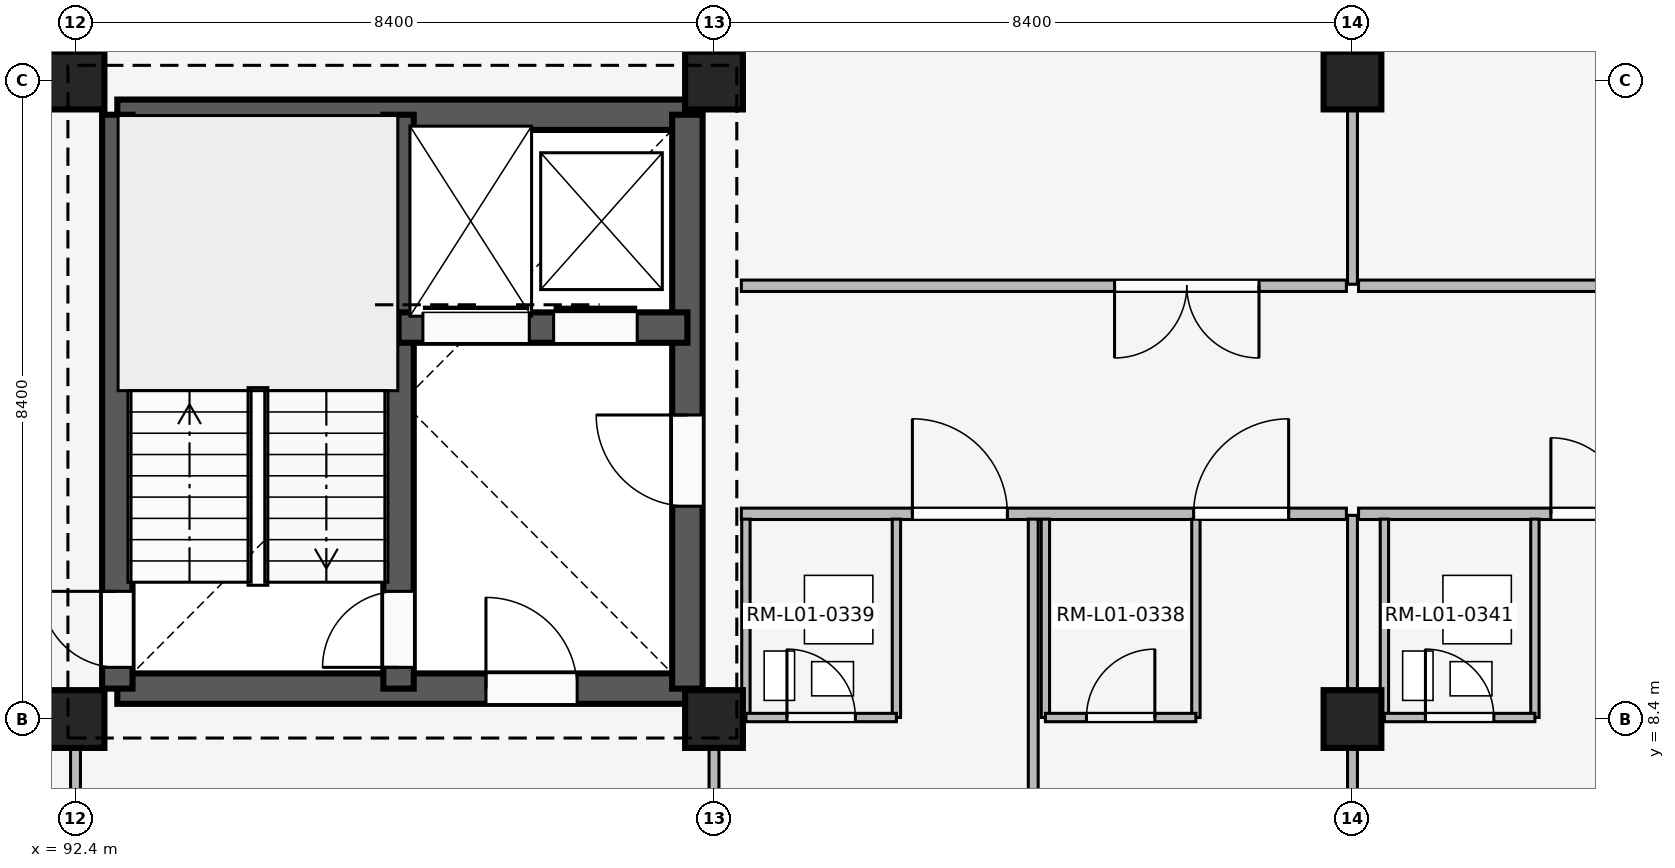
"""IFC4 building model, lengths in metres.
Left out: names, types, materials, properties, quantities, classifications, styles, units other than length and angle.
Written with IfcOpenShell. Run it as: python <this file> out.ifc"""

import sys

from ifc_helpers import new_model, si_unit, direction, frame, frame_2d, origin, origin_2d, place, context, subcontext, project, spatial, rectangle, extrude, element, fill, save


model = new_model("IFC4")
c1 = context("Model", 3, precision=1e-05, world=origin(), true_north=direction((0.0, 1.0)))
c2 = subcontext(c1, "Body", "Model", "MODEL_VIEW")
j1 = project(units=[si_unit("LENGTHUNIT", "METRE"), si_unit("PLANEANGLEUNIT", "RADIAN")], contexts=[c1])
p1 = place(None, origin())
s1 = spatial("IfcSite", under=j1, at=p1, CompositionType="ELEMENT")
p2 = place(p1, origin())
s2 = spatial("IfcBuilding", under=s1, at=p2, CompositionType="ELEMENT")
p3 = place(p2, frame((0.0, 0.0, 4.8)))
s3 = spatial("IfcBuildingStorey", under=s2, at=p3, CompositionType="ELEMENT", Elevation=4.8)
for number, where, z_axis, x_axis in (
    (1, (92.4, 8.4, 0.0), (0.0, 0.0, 1.0), (1.0, 0.0, 0.0)),
    (2, (92.4, 16.8, 0.0), (0.0, 0.0, 1.0), (1.0, 0.0, 0.0)),
    (3, (100.8, 8.4, 0.0), (0.0, 0.0, 1.0), (1.0, 0.0, 0.0)),
    (4, (100.8, 16.8, 0.0), (0.0, 0.0, 1.0), (1.0, 0.0, 0.0)),
    (5, (109.2, 8.4, 0.0), (0.0, 0.0, 1.0), (1.0, 0.0, 0.0)),
    (6, (109.2, 16.8, 0.0), (0.0, 0.0, 1.0), (1.0, 0.0, 0.0)),
):
    element("IfcColumn", number, at=place(p3, frame(where, z_axis=z_axis, x_axis=x_axis)), inside=s3, PredefinedType="COLUMN", context=c2, shape_type="SweptSolid", body=[
        extrude(rectangle(XDim=0.76, YDim=0.76, at=origin_2d()), origin(), (0.0, 0.0, 1.0), 3.3),
    ])
p4 = place(p3, frame((92.95, 8.8, 0.0), z_axis=(0.0, 0.0, 1.0), x_axis=(1.0, 0.0, 0.0)))
e7 = element("IfcWall", 7, at=p4, inside=s3, PredefinedType="SHEAR", context=c2, shape_type="SweptSolid", body=[
    extrude(rectangle(XDim=7.5, YDim=0.4, at=frame_2d((3.75, 0.0))), origin(), (0.0, 0.0, 1.0), 3.02),
])
p5 = place(p4, frame((4.85, 0.0, 0.0)))
e8 = element("IfcOpeningElement", 8, at=p5, cuts=e7, PredefinedType="OPENING", context=c2, shape_type="SweptSolid", body=[
    extrude(rectangle(XDim=1.2, YDim=2.1, at=frame_2d((0.6, 1.05))), frame((0.0, 0.21, 0.0), z_axis=(0.0, -1.0, 0.0), x_axis=(1.0, 0.0, 0.0)), (0.0, 0.0, 1.0), 0.42),
])
p6 = place(p3, frame((92.95, 16.35, 0.0), z_axis=(0.0, 0.0, 1.0), x_axis=(1.0, 0.0, 0.0)))
e9 = element("IfcWall", 9, at=p6, inside=s3, PredefinedType="SHEAR", context=c2, shape_type="SweptSolid", body=[
    extrude(rectangle(XDim=7.5, YDim=0.4, at=frame_2d((3.75, 0.0))), origin(), (0.0, 0.0, 1.0), 3.02),
])
p7 = place(p3, frame((92.95, 8.8, 0.0), z_axis=(0.0, 0.0, 1.0), x_axis=(0.0, 1.0, 0.0)))
e10 = element("IfcWall", 10, at=p7, inside=s3, PredefinedType="SHEAR", context=c2, shape_type="SweptSolid", body=[
    extrude(rectangle(XDim=7.55, YDim=0.4, at=frame_2d((3.775, 0.0))), origin(), (0.0, 0.0, 1.0), 3.02),
])
p8 = place(p7, frame((0.28, 0.0, 0.0)))
e11 = element("IfcOpeningElement", 11, at=p8, cuts=e10, PredefinedType="OPENING", context=c2, shape_type="SweptSolid", body=[
    extrude(rectangle(XDim=1.0, YDim=2.15, at=frame_2d((0.5, 1.075))), frame((0.0, 0.21, 0.0), z_axis=(0.0, -1.0, 0.0), x_axis=(1.0, 0.0, 0.0)), (0.0, 0.0, 1.0), 0.42),
])
p9 = place(p3, frame((100.45, 8.8, 0.0), z_axis=(0.0, 0.0, 1.0), x_axis=(0.0, 1.0, 0.0)))
e12 = element("IfcWall", 12, at=p9, inside=s3, PredefinedType="SHEAR", context=c2, shape_type="SweptSolid", body=[
    extrude(rectangle(XDim=7.55, YDim=0.4, at=frame_2d((3.775, 0.0))), origin(), (0.0, 0.0, 1.0), 3.02),
])
p10 = place(p9, frame((2.4, 0.0, 0.0)))
e13 = element("IfcOpeningElement", 13, at=p10, cuts=e12, PredefinedType="OPENING", context=c2, shape_type="SweptSolid", body=[
    extrude(rectangle(XDim=1.2, YDim=2.2, at=frame_2d((0.6, 1.1))), frame((0.0, 0.21, 0.0), z_axis=(0.0, -1.0, 0.0), x_axis=(1.0, 0.0, 0.0)), (0.0, 0.0, 1.0), 0.42),
])
p11 = place(p3, frame((96.65, 8.8, 0.0), z_axis=(0.0, 0.0, 1.0), x_axis=(0.0, 1.0, 0.0)))
e14 = element("IfcWall", 14, at=p11, inside=s3, PredefinedType="SHEAR", context=c2, shape_type="SweptSolid", body=[
    extrude(rectangle(XDim=7.55, YDim=0.4, at=frame_2d((3.775, 0.0))), origin(), (0.0, 0.0, 1.0), 3.02),
])
p12 = place(p11, frame((0.28, 0.0, 0.0)))
e15 = element("IfcOpeningElement", 15, at=p12, cuts=e14, PredefinedType="OPENING", context=c2, shape_type="SweptSolid", body=[
    extrude(rectangle(XDim=1.0, YDim=2.15, at=frame_2d((0.5, 1.075))), frame((0.0, 0.21, 0.0), z_axis=(0.0, -1.0, 0.0), x_axis=(1.0, 0.0, 0.0)), (0.0, 0.0, 1.0), 0.42),
])
p13 = place(p3, frame((96.65, 13.55, 0.0), z_axis=(0.0, 0.0, 1.0), x_axis=(1.0, 0.0, 0.0)))
e16 = element("IfcWall", 16, at=p13, inside=s3, PredefinedType="SHEAR", context=c2, shape_type="SweptSolid", body=[
    extrude(rectangle(XDim=3.8, YDim=0.4, at=frame_2d((1.9, 0.0))), origin(), (0.0, 0.0, 1.0), 3.02),
])
p14 = place(p13, frame((0.32, 0.0, 0.0)))
e17 = element("IfcOpeningElement", 17, at=p14, cuts=e16, PredefinedType="OPENING", context=c2, shape_type="SweptSolid", body=[
    extrude(rectangle(XDim=1.4, YDim=2.25, at=frame_2d((0.7, 1.125))), frame((0.0, 0.21, 0.0), z_axis=(0.0, -1.0, 0.0), x_axis=(1.0, 0.0, 0.0)), (0.0, 0.0, 1.0), 0.42),
])
p15 = place(p13, frame((2.04, 0.0, 0.0)))
e18 = element("IfcOpeningElement", 18, at=p15, cuts=e16, PredefinedType="OPENING", context=c2, shape_type="SweptSolid", body=[
    extrude(rectangle(XDim=1.1, YDim=2.15, at=frame_2d((0.55, 1.075))), frame((0.0, 0.21, 0.0), z_axis=(0.0, -1.0, 0.0), x_axis=(1.0, 0.0, 0.0)), (0.0, 0.0, 1.0), 0.42),
])
p16 = place(p3, frame((92.4, 0.14, 0.0), z_axis=(0.0, 0.0, 1.0), x_axis=(0.0, 1.0, 0.0)))
e19 = element("IfcWall", 19, at=p16, inside=s3, PredefinedType="PARTITIONING", context=c2, shape_type="SweptSolid", body=[
    extrude(rectangle(XDim=8.21, YDim=0.13, at=frame_2d((4.105, 0.0))), origin(), (0.0, 0.0, 1.0), 2.4),
])
p17 = place(p16, frame((3.64, 0.0, 0.0)))
e20 = element("IfcOpeningElement", 20, at=p17, cuts=e19, PredefinedType="OPENING", context=c2, shape_type="SweptSolid", body=[
    extrude(rectangle(XDim=1.08, YDim=2.15, at=frame_2d((0.54, 1.075))), frame((0.0, 0.075, 0.0), z_axis=(0.0, -1.0, 0.0), x_axis=(1.0, 0.0, 0.0)), (0.0, 0.0, 1.0), 0.15),
])
p18 = place(p3, frame((92.4, 17.15, 0.0), z_axis=(0.0, 0.0, 1.0), x_axis=(0.0, 1.0, 0.0)))
e21 = element("IfcWall", 21, at=p18, inside=s3, PredefinedType="PARTITIONING", context=c2, shape_type="SweptSolid", body=[
    extrude(rectangle(XDim=7.91, YDim=0.13, at=frame_2d((3.955, 0.0))), origin(), (0.0, 0.0, 1.0), 2.4),
])
p19 = place(p18, frame((3.4, 0.0, 0.0)))
e22 = element("IfcOpeningElement", 22, at=p19, cuts=e21, PredefinedType="OPENING", context=c2, shape_type="SweptSolid", body=[
    extrude(rectangle(XDim=1.05, YDim=2.2, at=frame_2d((0.525, 1.1))), frame((0.0, 0.075, 0.0), z_axis=(0.0, -1.0, 0.0), x_axis=(1.0, 0.0, 0.0)), (0.0, 0.0, 1.0), 0.15),
])
p20 = place(p3, frame((100.8, 0.14, 0.0), z_axis=(0.0, 0.0, 1.0), x_axis=(0.0, 1.0, 0.0)))
e23 = element("IfcWall", 23, at=p20, inside=s3, PredefinedType="PARTITIONING", context=c2, shape_type="SweptSolid", body=[
    extrude(rectangle(XDim=8.21, YDim=0.13, at=frame_2d((4.105, 0.0))), origin(), (0.0, 0.0, 1.0), 2.4),
])
p21 = place(p20, frame((3.64, 0.0, 0.0)))
e24 = element("IfcOpeningElement", 24, at=p21, cuts=e23, PredefinedType="OPENING", context=c2, shape_type="SweptSolid", body=[
    extrude(rectangle(XDim=1.08, YDim=2.15, at=frame_2d((0.54, 1.075))), frame((0.0, 0.075, 0.0), z_axis=(0.0, -1.0, 0.0), x_axis=(1.0, 0.0, 0.0)), (0.0, 0.0, 1.0), 0.15),
])
p22 = place(p3, frame((100.8, 17.15, 0.0), z_axis=(0.0, 0.0, 1.0), x_axis=(0.0, 1.0, 0.0)))
e25 = element("IfcWall", 25, at=p22, inside=s3, PredefinedType="PARTITIONING", context=c2, shape_type="SweptSolid", body=[
    extrude(rectangle(XDim=7.91, YDim=0.13, at=frame_2d((3.955, 0.0))), origin(), (0.0, 0.0, 1.0), 2.4),
])
p23 = place(p22, frame((3.4, 0.0, 0.0)))
e26 = element("IfcOpeningElement", 26, at=p23, cuts=e25, PredefinedType="OPENING", context=c2, shape_type="SweptSolid", body=[
    extrude(rectangle(XDim=1.05, YDim=2.2, at=frame_2d((0.525, 1.1))), frame((0.0, 0.075, 0.0), z_axis=(0.0, -1.0, 0.0), x_axis=(1.0, 0.0, 0.0)), (0.0, 0.0, 1.0), 0.15),
])
p24 = place(p3, frame((101.16, 11.1, 0.0), z_axis=(0.0, 0.0, 1.0), x_axis=(1.0, 0.0, 0.0)))
e27 = element("IfcWall", 27, at=p24, inside=s3, PredefinedType="PARTITIONING", context=c2, shape_type="SweptSolid", body=[
    extrude(rectangle(XDim=7.96, YDim=0.15, at=frame_2d((3.98, 0.0))), origin(), (0.0, 0.0, 1.0), 2.4),
])
p25 = place(p24, frame((2.25, 0.0, 0.0)))
e28 = element("IfcOpeningElement", 28, at=p25, cuts=e27, PredefinedType="OPENING", context=c2, shape_type="SweptSolid", body=[
    extrude(rectangle(XDim=1.25, YDim=2.2, at=frame_2d((0.625, 1.1))), frame((0.0, 0.085, 0.0), z_axis=(0.0, -1.0, 0.0), x_axis=(1.0, 0.0, 0.0)), (0.0, 0.0, 1.0), 0.17),
])
p26 = place(p24, frame((5.95, 0.0, 0.0)))
e29 = element("IfcOpeningElement", 29, at=p26, cuts=e27, PredefinedType="OPENING", context=c2, shape_type="SweptSolid", body=[
    extrude(rectangle(XDim=1.25, YDim=2.2, at=frame_2d((0.625, 1.1))), frame((0.0, 0.085, 0.0), z_axis=(0.0, -1.0, 0.0), x_axis=(1.0, 0.0, 0.0)), (0.0, 0.0, 1.0), 0.17),
])
p27 = place(p3, frame((105.0, 0.1, 0.0), z_axis=(0.0, 0.0, 1.0), x_axis=(0.0, 1.0, 0.0)))
e30 = element("IfcWall", 30, at=p27, inside=s3, PredefinedType="PARTITIONING", context=c2, shape_type="SweptSolid", body=[
    extrude(rectangle(XDim=10.93, YDim=0.13, at=frame_2d((5.465, 0.0))), origin(), (0.0, 0.0, 1.0), 2.4),
])
for number, where, z_axis, x_axis in (
    (31, (101.22, 8.42, 0.0), (0.0, 0.0, 1.0), (0.0, 1.0, 0.0)),
    (32, (103.2, 8.42, 0.0), (0.0, 0.0, 1.0), (0.0, 1.0, 0.0)),
):
    element("IfcWall", number, at=place(p3, frame(where, z_axis=z_axis, x_axis=x_axis)), inside=s3, PredefinedType="PARTITIONING", context=c2, shape_type="SweptSolid", body=[
        extrude(rectangle(XDim=2.61, YDim=0.11, at=frame_2d((1.305, 0.0))), origin(), (0.0, 0.0, 1.0), 2.4),
    ])
p28 = place(p3, frame((101.22, 8.42, 0.0), z_axis=(0.0, 0.0, 1.0), x_axis=(1.0, 0.0, 0.0)))
e33 = element("IfcWall", 33, at=p28, inside=s3, PredefinedType="PARTITIONING", context=c2, shape_type="SweptSolid", body=[
    extrude(rectangle(XDim=1.98, YDim=0.11, at=frame_2d((0.99, 0.0))), origin(), (0.0, 0.0, 1.0), 2.4),
])
p29 = place(p28, frame((0.54, 0.0, 0.0)))
e34 = element("IfcOpeningElement", 34, at=p29, cuts=e33, PredefinedType="OPENING", context=c2, shape_type="SweptSolid", body=[
    extrude(rectangle(XDim=0.9, YDim=2.1, at=frame_2d((0.45, 1.05))), frame((0.0, 0.065, 0.0), z_axis=(0.0, -1.0, 0.0), x_axis=(1.0, 0.0, 0.0)), (0.0, 0.0, 1.0), 0.13),
])
for number, where, z_axis, x_axis in (
    (35, (105.16, 8.42, 0.0), (0.0, 0.0, 1.0), (0.0, 1.0, 0.0)),
    (36, (107.14, 8.42, 0.0), (0.0, 0.0, 1.0), (0.0, 1.0, 0.0)),
):
    element("IfcWall", number, at=place(p3, frame(where, z_axis=z_axis, x_axis=x_axis)), inside=s3, PredefinedType="PARTITIONING", context=c2, shape_type="SweptSolid", body=[
        extrude(rectangle(XDim=2.61, YDim=0.11, at=frame_2d((1.305, 0.0))), origin(), (0.0, 0.0, 1.0), 2.4),
    ])
p30 = place(p3, frame((105.16, 8.42, 0.0), z_axis=(0.0, 0.0, 1.0), x_axis=(1.0, 0.0, 0.0)))
e37 = element("IfcWall", 37, at=p30, inside=s3, PredefinedType="PARTITIONING", context=c2, shape_type="SweptSolid", body=[
    extrude(rectangle(XDim=1.98, YDim=0.11, at=frame_2d((0.99, 0.0))), origin(), (0.0, 0.0, 1.0), 2.4),
])
p31 = place(p30, frame((0.54, 0.0, 0.0)))
e38 = element("IfcOpeningElement", 38, at=p31, cuts=e37, PredefinedType="OPENING", context=c2, shape_type="SweptSolid", body=[
    extrude(rectangle(XDim=0.9, YDim=2.1, at=frame_2d((0.45, 1.05))), frame((0.0, 0.065, 0.0), z_axis=(0.0, -1.0, 0.0), x_axis=(1.0, 0.0, 0.0)), (0.0, 0.0, 1.0), 0.13),
])
p32 = place(p3, frame((109.12, 14.1, 0.0), z_axis=(0.0, 0.0, 1.0), x_axis=(-1.0, 0.0, 0.0)))
e39 = element("IfcWall", 39, at=p32, inside=s3, PredefinedType="PARTITIONING", context=c2, shape_type="SweptSolid", body=[
    extrude(rectangle(XDim=7.96, YDim=0.15, at=frame_2d((3.98, 0.0))), origin(), (0.0, 0.0, 1.0), 2.4),
])
p33 = place(p32, frame((1.15, 0.0, 0.0)))
e40 = element("IfcOpeningElement", 40, at=p33, cuts=e39, PredefinedType="OPENING", context=c2, shape_type="SweptSolid", body=[
    extrude(rectangle(XDim=1.9, YDim=2.3, at=frame_2d((0.95, 1.15))), frame((0.0, 0.085, 0.0), z_axis=(0.0, -1.0, 0.0), x_axis=(1.0, 0.0, 0.0)), (0.0, 0.0, 1.0), 0.17),
])
p34 = place(p3, frame((109.2, 0.14, 0.0), z_axis=(0.0, 0.0, 1.0), x_axis=(0.0, 1.0, 0.0)))
e41 = element("IfcWall", 41, at=p34, inside=s3, PredefinedType="PARTITIONING", context=c2, shape_type="SweptSolid", body=[
    extrude(rectangle(XDim=10.94, YDim=0.13, at=frame_2d((5.47, 0.0))), origin(), (0.0, 0.0, 1.0), 2.4),
])
p35 = place(p3, frame((109.2, 14.12, 0.0), z_axis=(0.0, 0.0, 1.0), x_axis=(0.0, 1.0, 0.0)))
e42 = element("IfcWall", 42, at=p35, inside=s3, PredefinedType="PARTITIONING", context=c2, shape_type="SweptSolid", body=[
    extrude(rectangle(XDim=10.94, YDim=0.13, at=frame_2d((5.47, 0.0))), origin(), (0.0, 0.0, 1.0), 2.4),
])
p36 = place(p3, frame((109.28, 11.1, 0.0), z_axis=(0.0, 0.0, 1.0), x_axis=(1.0, 0.0, 0.0)))
e43 = element("IfcWall", 43, at=p36, inside=s3, PredefinedType="PARTITIONING", context=c2, shape_type="SweptSolid", body=[
    extrude(rectangle(XDim=8.24, YDim=0.15, at=frame_2d((4.12, 0.0))), origin(), (0.0, 0.0, 1.0), 2.4),
])
p37 = place(p36, frame((2.53, 0.0, 0.0)))
e44 = element("IfcOpeningElement", 44, at=p37, cuts=e43, PredefinedType="OPENING", context=c2, shape_type="SweptSolid", body=[
    extrude(rectangle(XDim=1.0, YDim=2.15, at=frame_2d((0.5, 1.075))), frame((0.0, 0.085, 0.0), z_axis=(0.0, -1.0, 0.0), x_axis=(1.0, 0.0, 0.0)), (0.0, 0.0, 1.0), 0.17),
])
p38 = place(p36, frame((6.23, 0.0, 0.0)))
e45 = element("IfcOpeningElement", 45, at=p38, cuts=e43, PredefinedType="OPENING", context=c2, shape_type="SweptSolid", body=[
    extrude(rectangle(XDim=1.0, YDim=2.15, at=frame_2d((0.5, 1.075))), frame((0.0, 0.085, 0.0), z_axis=(0.0, -1.0, 0.0), x_axis=(1.0, 0.0, 0.0)), (0.0, 0.0, 1.0), 0.17),
])
for number, where, z_axis, x_axis in (
    (46, (109.62, 8.42, 0.0), (0.0, 0.0, 1.0), (0.0, 1.0, 0.0)),
    (47, (111.6, 8.42, 0.0), (0.0, 0.0, 1.0), (0.0, 1.0, 0.0)),
):
    element("IfcWall", number, at=place(p3, frame(where, z_axis=z_axis, x_axis=x_axis)), inside=s3, PredefinedType="PARTITIONING", context=c2, shape_type="SweptSolid", body=[
        extrude(rectangle(XDim=2.61, YDim=0.11, at=frame_2d((1.305, 0.0))), origin(), (0.0, 0.0, 1.0), 2.4),
    ])
p39 = place(p3, frame((109.62, 8.42, 0.0), z_axis=(0.0, 0.0, 1.0), x_axis=(1.0, 0.0, 0.0)))
e48 = element("IfcWall", 48, at=p39, inside=s3, PredefinedType="PARTITIONING", context=c2, shape_type="SweptSolid", body=[
    extrude(rectangle(XDim=1.98, YDim=0.11, at=frame_2d((0.99, 0.0))), origin(), (0.0, 0.0, 1.0), 2.4),
])
p40 = place(p39, frame((0.54, 0.0, 0.0)))
e49 = element("IfcOpeningElement", 49, at=p40, cuts=e48, PredefinedType="OPENING", context=c2, shape_type="SweptSolid", body=[
    extrude(rectangle(XDim=0.9, YDim=2.1, at=frame_2d((0.45, 1.05))), frame((0.0, 0.065, 0.0), z_axis=(0.0, -1.0, 0.0), x_axis=(1.0, 0.0, 0.0)), (0.0, 0.0, 1.0), 0.13),
])
p41 = place(p3, frame((117.52, 14.1, 0.0), z_axis=(0.0, 0.0, 1.0), x_axis=(-1.0, 0.0, 0.0)))
e50 = element("IfcWall", 50, at=p41, inside=s3, PredefinedType="PARTITIONING", context=c2, shape_type="SweptSolid", body=[
    extrude(rectangle(XDim=8.24, YDim=0.15, at=frame_2d((4.12, 0.0))), origin(), (0.0, 0.0, 1.0), 2.4),
])
p42 = place(p41, frame((3.57, 0.0, 0.0)))
e51 = element("IfcOpeningElement", 51, at=p42, cuts=e50, PredefinedType="OPENING", context=c2, shape_type="SweptSolid", body=[
    extrude(rectangle(XDim=1.1, YDim=2.2, at=frame_2d((0.55, 1.1))), frame((0.0, 0.085, 0.0), z_axis=(0.0, -1.0, 0.0), x_axis=(1.0, 0.0, 0.0)), (0.0, 0.0, 1.0), 0.17),
])
p43 = place(p10, origin())
e52 = element("IfcDoor", 52, at=p43, inside=s3, OperationType="SINGLE_SWING_RIGHT", PredefinedType="DOOR", context=c2, shape_type="SweptSolid", body=[
    extrude(rectangle(XDim=1.2, YDim=2.2, at=frame_2d((0.6, 1.1))), frame((0.0, 0.025, 0.0), z_axis=(0.0, -1.0, 0.0), x_axis=(1.0, 0.0, 0.0)), (0.0, 0.0, 1.0), 0.05),
])
fill(e13, e52)
p44 = place(p5, origin())
e53 = element("IfcDoor", 53, at=p44, inside=s3, OperationType="SINGLE_SWING_LEFT", PredefinedType="DOOR", context=c2, shape_type="SweptSolid", body=[
    extrude(rectangle(XDim=1.2, YDim=2.1, at=frame_2d((0.6, 1.05))), frame((0.0, 0.025, 0.0), z_axis=(0.0, -1.0, 0.0), x_axis=(1.0, 0.0, 0.0)), (0.0, 0.0, 1.0), 0.05),
])
fill(e8, e53)
p45 = place(p8, origin())
e54 = element("IfcDoor", 54, at=p45, inside=s3, OperationType="SINGLE_SWING_RIGHT", PredefinedType="DOOR", context=c2, shape_type="SweptSolid", body=[
    extrude(rectangle(XDim=1.0, YDim=2.15, at=frame_2d((0.5, 1.075))), frame((0.0, 0.025, 0.0), z_axis=(0.0, -1.0, 0.0), x_axis=(1.0, 0.0, 0.0)), (0.0, 0.0, 1.0), 0.05),
])
fill(e11, e54)
p46 = place(p12, origin())
e55 = element("IfcDoor", 55, at=p46, inside=s3, OperationType="SINGLE_SWING_LEFT", PredefinedType="DOOR", context=c2, shape_type="SweptSolid", body=[
    extrude(rectangle(XDim=1.0, YDim=2.15, at=frame_2d((0.5, 1.075))), frame((0.0, 0.025, 0.0), z_axis=(0.0, -1.0, 0.0), x_axis=(1.0, 0.0, 0.0)), (0.0, 0.0, 1.0), 0.05),
])
fill(e15, e55)
p47 = place(p14, origin())
e56 = element("IfcDoor", 56, at=p47, inside=s3, OperationType="SLIDING_TO_LEFT", PredefinedType="DOOR", context=c2, shape_type="SweptSolid", body=[
    extrude(rectangle(XDim=1.4, YDim=2.25, at=frame_2d((0.7, 1.125))), frame((0.0, 0.025, 0.0), z_axis=(0.0, -1.0, 0.0), x_axis=(1.0, 0.0, 0.0)), (0.0, 0.0, 1.0), 0.05),
])
fill(e17, e56)
p48 = place(p15, origin())
e57 = element("IfcDoor", 57, at=p48, inside=s3, OperationType="SLIDING_TO_LEFT", PredefinedType="DOOR", context=c2, shape_type="SweptSolid", body=[
    extrude(rectangle(XDim=1.1, YDim=2.15, at=frame_2d((0.55, 1.075))), frame((0.0, 0.025, 0.0), z_axis=(0.0, -1.0, 0.0), x_axis=(1.0, 0.0, 0.0)), (0.0, 0.0, 1.0), 0.05),
])
fill(e18, e57)
p49 = place(p25, origin())
e58 = element("IfcDoor", 58, at=p49, inside=s3, OperationType="SINGLE_SWING_LEFT", PredefinedType="DOOR", context=c2, shape_type="SweptSolid", body=[
    extrude(rectangle(XDim=1.25, YDim=2.2, at=frame_2d((0.625, 1.1))), frame((0.0, 0.025, 0.0), z_axis=(0.0, -1.0, 0.0), x_axis=(1.0, 0.0, 0.0)), (0.0, 0.0, 1.0), 0.05),
])
fill(e28, e58)
p50 = place(p26, origin())
e59 = element("IfcDoor", 59, at=p50, inside=s3, OperationType="SINGLE_SWING_RIGHT", PredefinedType="DOOR", context=c2, shape_type="SweptSolid", body=[
    extrude(rectangle(XDim=1.25, YDim=2.2, at=frame_2d((0.625, 1.1))), frame((0.0, 0.025, 0.0), z_axis=(0.0, -1.0, 0.0), x_axis=(1.0, 0.0, 0.0)), (0.0, 0.0, 1.0), 0.05),
])
fill(e29, e59)
p51 = place(p29, origin())
e60 = element("IfcDoor", 60, at=p51, inside=s3, OperationType="SINGLE_SWING_LEFT", PredefinedType="DOOR", context=c2, shape_type="SweptSolid", body=[
    extrude(rectangle(XDim=0.9, YDim=2.1, at=frame_2d((0.45, 1.05))), frame((0.0, 0.025, 0.0), z_axis=(0.0, -1.0, 0.0), x_axis=(1.0, 0.0, 0.0)), (0.0, 0.0, 1.0), 0.05),
])
fill(e34, e60)
p52 = place(p31, origin())
e61 = element("IfcDoor", 61, at=p52, inside=s3, OperationType="SINGLE_SWING_RIGHT", PredefinedType="DOOR", context=c2, shape_type="SweptSolid", body=[
    extrude(rectangle(XDim=0.9, YDim=2.1, at=frame_2d((0.45, 1.05))), frame((0.0, 0.025, 0.0), z_axis=(0.0, -1.0, 0.0), x_axis=(1.0, 0.0, 0.0)), (0.0, 0.0, 1.0), 0.05),
])
fill(e38, e61)
p53 = place(p33, origin())
e62 = element("IfcDoor", 62, at=p53, inside=s3, OperationType="DOUBLE_SWING_LEFT", PredefinedType="DOOR", context=c2, shape_type="SweptSolid", body=[
    extrude(rectangle(XDim=1.9, YDim=2.3, at=frame_2d((0.95, 1.15))), frame((0.0, 0.025, 0.0), z_axis=(0.0, -1.0, 0.0), x_axis=(1.0, 0.0, 0.0)), (0.0, 0.0, 1.0), 0.05),
])
fill(e40, e62)
p54 = place(p37, origin())
e63 = element("IfcDoor", 63, at=p54, inside=s3, OperationType="SINGLE_SWING_LEFT", PredefinedType="DOOR", context=c2, shape_type="SweptSolid", body=[
    extrude(rectangle(XDim=1.0, YDim=2.15, at=frame_2d((0.5, 1.075))), frame((0.0, 0.025, 0.0), z_axis=(0.0, -1.0, 0.0), x_axis=(1.0, 0.0, 0.0)), (0.0, 0.0, 1.0), 0.05),
])
fill(e44, e63)
p55 = place(p40, origin())
e64 = element("IfcDoor", 64, at=p55, inside=s3, OperationType="SINGLE_SWING_LEFT", PredefinedType="DOOR", context=c2, shape_type="SweptSolid", body=[
    extrude(rectangle(XDim=0.9, YDim=2.1, at=frame_2d((0.45, 1.05))), frame((0.0, 0.025, 0.0), z_axis=(0.0, -1.0, 0.0), x_axis=(1.0, 0.0, 0.0)), (0.0, 0.0, 1.0), 0.05),
])
fill(e49, e64)
save(model, sys.argv[1])
